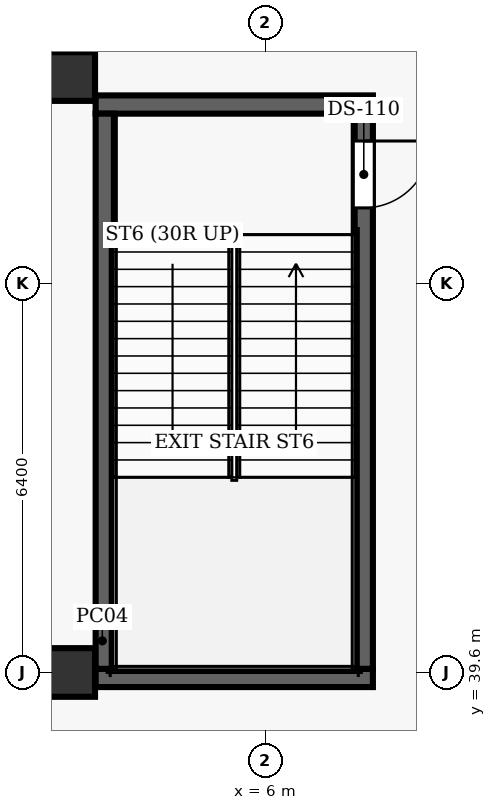
"""IFC4 building model, lengths in metres.
Left out: names, types, materials, properties, quantities, classifications, styles, units other than length and angle.
Written with IfcOpenShell. Run it as: python <this file> out.ifc"""

import sys

from ifc_helpers import new_model, si_unit, direction, frame, frame_2d, origin, origin_2d, place, context, subcontext, project, spatial, rectangle, extrude, element, fill, save


model = new_model("IFC4")
c1 = context("Model", 3, precision=1e-05, world=origin(), true_north=direction((0.0, 1.0)))
c2 = subcontext(c1, "Body", "Model", "MODEL_VIEW")
j1 = project(units=[si_unit("LENGTHUNIT", "METRE"), si_unit("PLANEANGLEUNIT", "RADIAN")], contexts=[c1])
p1 = place(None, origin())
s1 = spatial("IfcSite", under=j1, at=p1, CompositionType="ELEMENT")
p2 = place(p1, origin())
s2 = spatial("IfcBuilding", under=s1, at=p2, CompositionType="ELEMENT")
p3 = place(p2, frame((0.0, 0.0, 30.0)))
s3 = spatial("IfcBuildingStorey", under=s2, at=p3, CompositionType="ELEMENT", Elevation=30.0)
for number, where, z_axis, x_axis in (
    (1, (2.8, 39.6, 0.0), (0.0, 0.0, 1.0), (1.0, 0.0, 0.0)),
    (2, (2.8, 49.4, 0.0), (0.0, 0.0, 1.0), (1.0, 0.0, 0.0)),
):
    element("IfcColumn", number, at=place(p3, frame(where, z_axis=z_axis, x_axis=x_axis)), inside=s3, PredefinedType="COLUMN", context=c2, shape_type="SweptSolid", body=[
        extrude(rectangle(XDim=0.8, YDim=0.8, at=origin_2d()), origin(), (0.0, 0.0, 1.0), 5.4),
    ])
for number, where, z_axis, x_axis in (
    (3, (3.21, 39.51, 0.0), (0.0, 0.0, 1.0), (1.0, 0.0, 0.0)),
    (4, (3.21, 48.94, 0.0), (0.0, 0.0, 1.0), (1.0, 0.0, 0.0)),
):
    element("IfcWall", number, at=place(p3, frame(where, z_axis=z_axis, x_axis=x_axis)), inside=s3, PredefinedType="SHEAR", context=c2, shape_type="SweptSolid", body=[
        extrude(rectangle(XDim=4.56, YDim=0.3, at=frame_2d((2.28, 0.0))), origin(), (0.0, 0.0, 1.0), 5.4),
    ])
p4 = place(p3, frame((3.36, 39.66, 0.0), z_axis=(0.0, 0.0, 1.0), x_axis=(0.0, 1.0, 0.0)))
e5 = element("IfcWall", 5, at=p4, inside=s3, PredefinedType="SHEAR", context=c2, shape_type="SweptSolid", body=[
    extrude(rectangle(XDim=9.13, YDim=0.3, at=frame_2d((4.565, 0.0))), origin(), (0.0, 0.0, 1.0), 5.4),
])
p5 = place(p3, frame((7.62, 48.79, 0.0), z_axis=(0.0, 0.0, 1.0), x_axis=(0.0, -1.0, 0.0)))
e6 = element("IfcWall", 6, at=p5, inside=s3, PredefinedType="SHEAR", context=c2, shape_type="SweptSolid", body=[
    extrude(rectangle(XDim=9.13, YDim=0.3, at=frame_2d((4.565, 0.0))), origin(), (0.0, 0.0, 1.0), 5.4),
])
p6 = place(p5, frame((0.45, 0.0, 0.0)))
e7 = element("IfcOpeningElement", 7, at=p6, cuts=e6, PredefinedType="OPENING", context=c2, shape_type="SweptSolid", body=[
    extrude(rectangle(XDim=1.1, YDim=2.15, at=frame_2d((0.55, 1.075))), frame((0.0, 0.16, 0.0), z_axis=(0.0, -1.0, 0.0), x_axis=(1.0, 0.0, 0.0)), (0.0, 0.0, 1.0), 0.32),
])
p7 = place(p6, origin())
e8 = element("IfcDoor", 8, at=p7, inside=s3, OperationType="SINGLE_SWING_LEFT", PredefinedType="DOOR", context=c2, shape_type="SweptSolid", body=[
    extrude(rectangle(XDim=1.1, YDim=2.15, at=frame_2d((0.55, 1.075))), frame((0.0, 0.025, 0.0), z_axis=(0.0, -1.0, 0.0), x_axis=(1.0, 0.0, 0.0)), (0.0, 0.0, 1.0), 0.05),
])
fill(e7, e8)
save(model, sys.argv[1])
